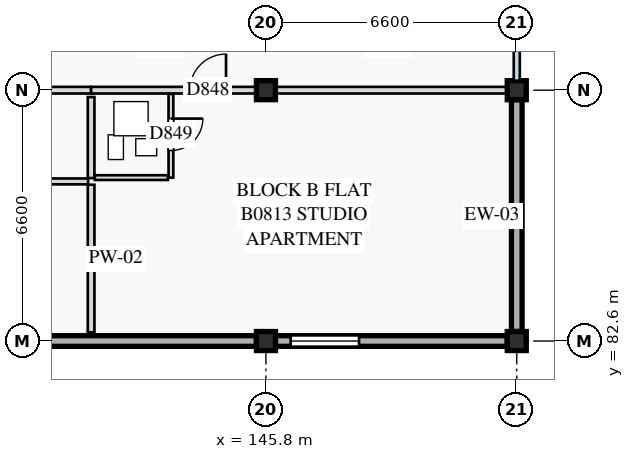
"""IFC4 building model, lengths in metres.
Left out: names, types, materials, properties, quantities, classifications, styles, units other than length and angle.
Written with IfcOpenShell. Run it as: python <this file> out.ifc"""

import sys

from ifc_helpers import new_model, si_unit, direction, frame, frame_2d, origin, origin_2d, place, context, subcontext, project, spatial, rectangle, extrude, element, fill, save


model = new_model("IFC4")
c1 = context("Model", 3, precision=1e-05, world=origin(), true_north=direction((0.0, 1.0)))
c2 = subcontext(c1, "Body", "Model", "MODEL_VIEW")
j1 = project(units=[si_unit("LENGTHUNIT", "METRE"), si_unit("PLANEANGLEUNIT", "RADIAN")], contexts=[c1])
p1 = place(None, origin())
s1 = spatial("IfcSite", under=j1, at=p1, CompositionType="ELEMENT")
p2 = place(p1, origin())
s2 = spatial("IfcBuilding", under=s1, at=p2, CompositionType="ELEMENT")
p3 = place(p2, frame((0.0, 0.0, 27.6)))
s3 = spatial("IfcBuildingStorey", under=s2, at=p3, CompositionType="ELEMENT", Elevation=27.6)
for number, where, z_axis, x_axis in (
    (1, (145.8, 82.6, 0.0), (0.0, 0.0, 1.0), (1.0, 0.0, 0.0)),
    (2, (145.8, 89.2, 0.0), (0.0, 0.0, 1.0), (1.0, 0.0, 0.0)),
    (3, (152.4, 82.6, 0.0), (0.0, 0.0, 1.0), (1.0, 0.0, 0.0)),
    (4, (152.4, 89.2, 0.0), (0.0, 0.0, 1.0), (1.0, 0.0, 0.0)),
):
    element("IfcColumn", number, at=place(p3, frame(where, z_axis=z_axis, x_axis=x_axis)), inside=s3, PredefinedType="COLUMN", context=c2, shape_type="SweptSolid", body=[
        extrude(rectangle(XDim=0.5, YDim=0.5, at=origin_2d()), origin(), (0.0, 0.0, 1.0), 3.2),
    ])
p4 = place(p3, frame((139.45, 82.6, 0.0), z_axis=(0.0, 0.0, 1.0), x_axis=(1.0, 0.0, 0.0)))
e5 = element("IfcWall", 5, at=p4, inside=s3, PredefinedType="STANDARD", context=c2, shape_type="SweptSolid", body=[
    extrude(rectangle(XDim=6.1, YDim=0.28, at=frame_2d((3.05, 0.0))), origin(), (0.0, 0.0, 1.0), 2.65),
])
p5 = place(p3, frame((146.05, 82.6, 0.0), z_axis=(0.0, 0.0, 1.0), x_axis=(1.0, 0.0, 0.0)))
e6 = element("IfcWall", 6, at=p5, inside=s3, PredefinedType="STANDARD", context=c2, shape_type="SweptSolid", body=[
    extrude(rectangle(XDim=6.1, YDim=0.28, at=frame_2d((3.05, 0.0))), origin(), (0.0, 0.0, 1.0), 2.65),
])
p6 = place(p5, frame((0.4, 0.0, 0.85)))
e7 = element("IfcOpeningElement", 7, at=p6, cuts=e6, PredefinedType="OPENING", context=c2, shape_type="SweptSolid", body=[
    extrude(rectangle(XDim=1.8, YDim=1.35, at=frame_2d((0.9, 0.675))), frame((0.0, 0.15, 0.0), z_axis=(0.0, -1.0, 0.0), x_axis=(1.0, 0.0, 0.0)), (0.0, 0.0, 1.0), 0.3),
])
p7 = place(p3, frame((152.4, 82.85, 0.0), z_axis=(0.0, 0.0, 1.0), x_axis=(0.0, 1.0, 0.0)))
e8 = element("IfcWall", 8, at=p7, inside=s3, PredefinedType="STANDARD", context=c2, shape_type="SweptSolid", body=[
    extrude(rectangle(XDim=6.1, YDim=0.28, at=frame_2d((3.05, 0.0))), origin(), (0.0, 0.0, 1.0), 2.65),
])
p8 = place(p3, frame((132.6, 89.2, 0.0), z_axis=(0.0, 0.0, 1.0), x_axis=(1.0, 0.0, 0.0)))
e9 = element("IfcWall", 9, at=p8, inside=s3, PredefinedType="PARTITIONING", context=c2, shape_type="SweptSolid", body=[
    extrude(rectangle(XDim=8.6, YDim=0.175, at=frame_2d((4.3, 0.0))), origin(), (0.0, 0.0, 1.0), 2.55),
])
p9 = place(p8, frame((3.725, 0.0, 0.0)))
e10 = element("IfcOpeningElement", 10, at=p9, cuts=e9, PredefinedType="OPENING", context=c2, shape_type="SweptSolid", body=[
    extrude(rectangle(XDim=0.95, YDim=2.16, at=frame_2d((0.475, 1.08))), frame((0.0, 0.097, 0.0), z_axis=(0.0, -1.0, 0.0), x_axis=(1.0, 0.0, 0.0)), (0.0, 0.0, 1.0), 0.195),
])
p10 = place(p3, frame((139.188, 86.8, 0.0), z_axis=(0.0, 0.0, 1.0), x_axis=(1.0, 0.0, 0.0)))
e11 = element("IfcWall", 11, at=p10, inside=s3, PredefinedType="PARTITIONING", context=c2, shape_type="SweptSolid", body=[
    extrude(rectangle(XDim=1.933, YDim=0.155, at=frame_2d((0.966, 0.0))), origin(), (0.0, 0.0, 1.0), 2.97),
])
p11 = place(p3, frame((141.2, 89.02, 0.0), z_axis=(0.0, 0.0, 1.0), x_axis=(0.0, -1.0, 0.0)))
e12 = element("IfcWall", 12, at=p11, inside=s3, PredefinedType="PARTITIONING", context=c2, shape_type="SweptSolid", body=[
    extrude(rectangle(XDim=2.133, YDim=0.175, at=frame_2d((1.066, 0.0))), origin(), (0.0, 0.0, 1.0), 2.97),
])
p12 = place(p3, frame((141.2, 86.712, 0.0), z_axis=(0.0, 0.0, 1.0), x_axis=(0.0, -1.0, 0.0)))
e13 = element("IfcWall", 13, at=p12, inside=s3, PredefinedType="PARTITIONING", context=c2, shape_type="SweptSolid", body=[
    extrude(rectangle(XDim=3.882, YDim=0.175, at=frame_2d((1.941, 0.0))), origin(), (0.0, 0.0, 1.0), 2.97),
])
p13 = place(p3, frame((141.2, 89.2, 0.0), z_axis=(0.0, 0.0, 1.0), x_axis=(1.0, 0.0, 0.0)))
e14 = element("IfcWall", 14, at=p13, inside=s3, PredefinedType="PARTITIONING", context=c2, shape_type="SweptSolid", body=[
    extrude(rectangle(XDim=11.2, YDim=0.175, at=frame_2d((5.6, 0.0))), origin(), (0.0, 0.0, 1.0), 2.55),
])
p14 = place(p13, frame((2.6, 0.0, 0.0)))
e15 = element("IfcOpeningElement", 15, at=p14, cuts=e14, PredefinedType="OPENING", context=c2, shape_type="SweptSolid", body=[
    extrude(rectangle(XDim=0.95, YDim=2.16, at=frame_2d((0.475, 1.08))), frame((0.0, 0.097, 0.0), z_axis=(0.0, -1.0, 0.0), x_axis=(1.0, 0.0, 0.0)), (0.0, 0.0, 1.0), 0.195),
])
p15 = place(p3, frame((143.3, 89.103, 0.0), z_axis=(0.0, 0.0, 1.0), x_axis=(0.0, -1.0, 0.0)))
e16 = element("IfcWall", 16, at=p15, inside=s3, PredefinedType="PARTITIONING", context=c2, shape_type="SweptSolid", body=[
    extrude(rectangle(XDim=2.203, YDim=0.125, at=frame_2d((1.101, 0.0))), origin(), (0.0, 0.0, 1.0), 2.97),
])
p16 = place(p15, frame((0.65, 0.0, 0.0)))
e17 = element("IfcOpeningElement", 17, at=p16, cuts=e16, PredefinedType="OPENING", context=c2, shape_type="SweptSolid", body=[
    extrude(rectangle(XDim=0.84, YDim=2.06, at=frame_2d((0.42, 1.03))), frame((0.0, 0.073, 0.0), z_axis=(0.0, -1.0, 0.0), x_axis=(1.0, 0.0, 0.0)), (0.0, 0.0, 1.0), 0.145),
])
p17 = place(p3, frame((141.298, 86.9, 0.0), z_axis=(0.0, 0.0, 1.0), x_axis=(1.0, 0.0, 0.0)))
e18 = element("IfcWall", 18, at=p17, inside=s3, PredefinedType="PARTITIONING", context=c2, shape_type="SweptSolid", body=[
    extrude(rectangle(XDim=1.922, YDim=0.125, at=frame_2d((0.961, 0.0))), origin(), (0.0, 0.0, 1.0), 2.97),
])
p18 = place(p6, origin())
e19 = element("IfcWindow", 19, at=p18, inside=s3, PartitioningType="SINGLE_PANEL", PredefinedType="WINDOW", context=c2, shape_type="SweptSolid", body=[
    extrude(rectangle(XDim=1.8, YDim=1.35, at=frame_2d((0.9, 0.675))), frame((0.0, 0.03, 0.0), z_axis=(0.0, -1.0, 0.0), x_axis=(1.0, 0.0, 0.0)), (0.0, 0.0, 1.0), 0.06),
])
fill(e7, e19)
p19 = place(p14, origin())
e20 = element("IfcDoor", 20, at=p19, inside=s3, OperationType="SINGLE_SWING_RIGHT", PredefinedType="DOOR", context=c2, shape_type="SweptSolid", body=[
    extrude(rectangle(XDim=0.95, YDim=2.16, at=frame_2d((0.475, 1.08))), frame((0.0, 0.025, 0.0), z_axis=(0.0, -1.0, 0.0), x_axis=(1.0, 0.0, 0.0)), (0.0, 0.0, 1.0), 0.05),
])
fill(e15, e20)
p20 = place(p16, origin())
e21 = element("IfcDoor", 21, at=p20, inside=s3, OperationType="SINGLE_SWING_LEFT", PredefinedType="DOOR", context=c2, shape_type="SweptSolid", body=[
    extrude(rectangle(XDim=0.84, YDim=2.06, at=frame_2d((0.42, 1.03))), frame((0.0, 0.025, 0.0), z_axis=(0.0, -1.0, 0.0), x_axis=(1.0, 0.0, 0.0)), (0.0, 0.0, 1.0), 0.05),
])
fill(e17, e21)
save(model, sys.argv[1])
